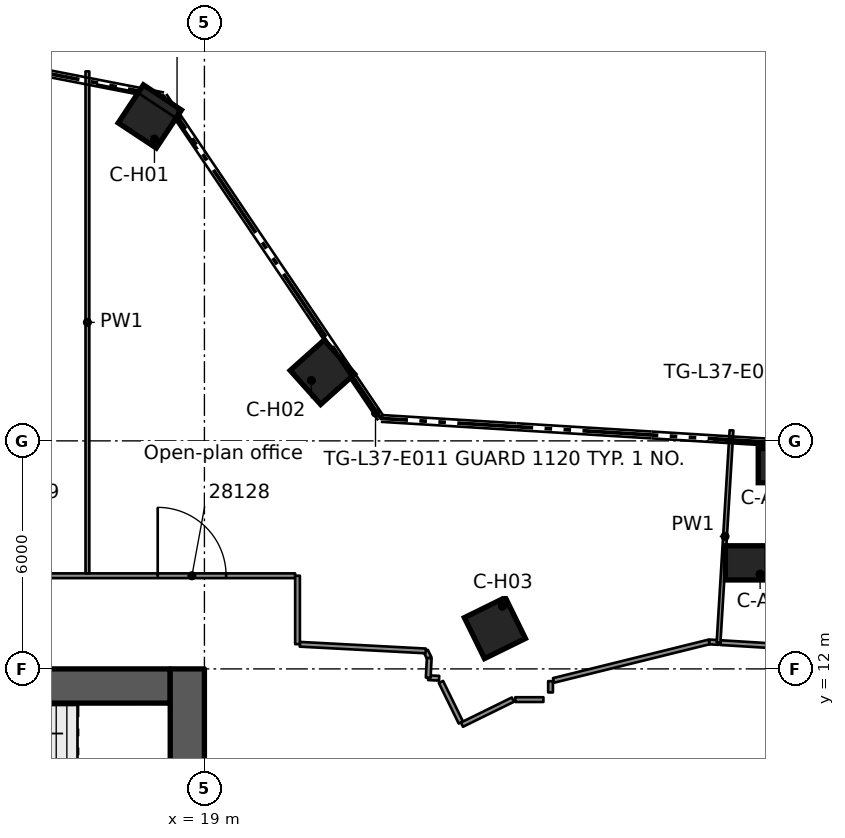
"""IFC4 building model, lengths in metres.
Left out: names, types, materials, properties, quantities, classifications, styles, units other than length and angle.
Written with IfcOpenShell. Run it as: python <this file> out.ifc"""

import sys

from ifc_helpers import new_model, si_unit, direction, frame, frame_2d, origin, origin_2d, place, context, subcontext, project, spatial, rectangle, extrude, element, fill, save


model = new_model("IFC4")
c1 = context("Model", 3, precision=1e-05, world=origin(), true_north=direction((0.0, 1.0)))
c2 = subcontext(c1, "Body", "Model", "MODEL_VIEW")
j1 = project(units=[si_unit("LENGTHUNIT", "METRE"), si_unit("PLANEANGLEUNIT", "RADIAN")], contexts=[c1])
p1 = place(None, origin())
s1 = spatial("IfcSite", under=j1, at=p1, CompositionType="ELEMENT")
p2 = place(p1, origin())
s2 = spatial("IfcBuilding", under=s1, at=p2, CompositionType="ELEMENT")
p3 = place(p2, frame((0.0, 0.0, 145.6)))
s3 = spatial("IfcBuildingStorey", under=s2, at=p3, CompositionType="ELEMENT", Elevation=145.6)
p4 = place(p3, frame((8.9, 11.55, 0.0), z_axis=(0.0, 0.0, 1.0), x_axis=(1.0, 0.0, 0.0)))
e1 = element("IfcWall", 1, at=p4, inside=s3, PredefinedType="SHEAR", context=c2, shape_type="SweptSolid", body=[
    extrude(rectangle(XDim=9.2, YDim=0.9, at=frame_2d((4.6, 0.0))), origin(), (0.0, 0.0, 1.0), 3.5),
])
p5 = place(p4, frame((3.0, 0.0, 0.0)))
e2 = element("IfcOpeningElement", 2, at=p5, cuts=e1, PredefinedType="OPENING", context=c2, shape_type="SweptSolid", body=[
    extrude(rectangle(XDim=1.1, YDim=2.1, at=frame_2d((0.55, 1.05))), frame((0.0, 0.46, 0.0), z_axis=(0.0, -1.0, 0.0), x_axis=(1.0, 0.0, 0.0)), (0.0, 0.0, 1.0), 0.92),
])
p6 = place(p3, frame((18.55, -12.0, 0.0), z_axis=(0.0, 0.0, 1.0), x_axis=(0.0, 1.0, 0.0)))
e3 = element("IfcWall", 3, at=p6, inside=s3, PredefinedType="SHEAR", context=c2, shape_type="SweptSolid", body=[
    extrude(rectangle(XDim=24.0, YDim=0.9, at=frame_2d((12.0, 0.0))), origin(), (0.0, 0.0, 1.0), 3.5),
])
p7 = place(p6, frame((12.1, 0.0, 0.0)))
e4 = element("IfcOpeningElement", 4, at=p7, cuts=e3, PredefinedType="OPENING", context=c2, shape_type="SweptSolid", body=[
    extrude(rectangle(XDim=1.8, YDim=2.1, at=frame_2d((0.9, 1.05))), frame((0.0, 0.46, 0.0), z_axis=(0.0, -1.0, 0.0), x_axis=(1.0, 0.0, 0.0)), (0.0, 0.0, 1.0), 0.92),
])
for number, where, z_axis, x_axis in (
    (5, (34.123, 17.349, 0.0), (0.0, 0.0, 1.0), (1.0, 0.0, 0.0)),
    (6, (33.258, 14.79, 0.0), (0.0, 0.0, 1.0), (1.0, 0.0, 0.0)),
):
    element("IfcColumn", number, at=place(p3, frame(where, z_axis=z_axis, x_axis=x_axis)), inside=s3, PredefinedType="COLUMN", context=c2, shape_type="SweptSolid", body=[
        extrude(rectangle(XDim=1.1, YDim=0.9, at=origin_2d()), origin(), (0.0, 0.0, 1.0), 3.5),
    ])
for number, where, z_axis, x_axis in (
    (7, (17.564, 26.536, 0.0), (0.0, 0.0, 1.0), (0.552, 0.834, 0.0)),
    (8, (22.104, 19.806, 0.0), (0.0, 0.0, 1.0), (0.745, 0.667, 0.0)),
    (9, (26.644, 13.075, 0.0), (0.0, 0.0, 1.0), (0.898, 0.441, 0.0)),
):
    element("IfcColumn", number, at=place(p3, frame(where, z_axis=z_axis, x_axis=x_axis)), inside=s3, PredefinedType="COLUMN", context=c2, shape_type="SweptSolid", body=[
        extrude(rectangle(XDim=1.2, YDim=1.2, at=origin_2d()), origin(), (0.0, 0.0, 1.0), 3.5),
    ])
p8 = place(p3, frame((24.824, 12.473, 0.0), z_axis=(0.0, 0.0, 1.0), x_axis=(0.437897211912, -0.899025045146, 0.0)))
e10 = element("IfcWall", 10, at=p8, inside=s3, PredefinedType="PARTITIONING", context=c2, shape_type="SweptSolid", body=[
    extrude(rectangle(XDim=0.21, YDim=0.125, at=frame_2d((0.105, 0.0))), origin(), (0.0, 0.0, 1.0), 3.08),
])
p9 = place(p3, frame((25.224, 11.657, 0.0), z_axis=(0.0, 0.0, 1.0), x_axis=(0.440468693638, -0.897767971096, 0.0)))
e11 = element("IfcWall", 11, at=p9, inside=s3, PredefinedType="PARTITIONING", context=c2, shape_type="SweptSolid", body=[
    extrude(rectangle(XDim=1.189, YDim=0.125, at=frame_2d((0.595, 0.0))), origin(), (0.0, 0.0, 1.0), 3.08),
])
p10 = place(p3, frame((32.281, 12.71, 0.0), z_axis=(0.0, 0.0, 1.0), x_axis=(0.998202495197, -0.059931449023, 0.0)))
e12 = element("IfcWall", 12, at=p10, inside=s3, PredefinedType="PARTITIONING", context=c2, shape_type="SweptSolid", body=[
    extrude(rectangle(XDim=0.249, YDim=0.125, at=frame_2d((0.124, 0.0))), origin(), (0.0, 0.0, 1.0), 3.08),
])
p11 = place(p3, frame((32.579, 12.692, 0.0), z_axis=(0.0, 0.0, 1.0), x_axis=(0.99812401512, -0.061224590168, 0.0)))
e13 = element("IfcWall", 13, at=p11, inside=s3, PredefinedType="PARTITIONING", context=c2, shape_type="SweptSolid", body=[
    extrude(rectangle(XDim=4.638, YDim=0.125, at=frame_2d((2.319, 0.0))), origin(), (0.0, 0.0, 1.0), 3.08),
])
p12 = place(p3, frame((24.889, 11.769, 0.0), z_axis=(0.0, 0.0, 1.0), x_axis=(0.998613133858, -0.052647971343, 0.0)))
e14 = element("IfcWall", 14, at=p12, inside=s3, PredefinedType="PARTITIONING", context=c2, shape_type="SweptSolid", body=[
    extrude(rectangle(XDim=0.288, YDim=0.125, at=frame_2d((0.144, 0.0))), origin(), (0.0, 0.0, 1.0), 3.08),
])
p13 = place(p3, frame((21.512, 12.648, 0.0), z_axis=(0.0, 0.0, 1.0), x_axis=(0.998605393802, -0.052794578038, 0.0)))
e15 = element("IfcWall", 15, at=p13, inside=s3, PredefinedType="PARTITIONING", context=c2, shape_type="SweptSolid", body=[
    extrude(rectangle(XDim=3.316, YDim=0.125, at=frame_2d((1.658, 0.0))), origin(), (0.0, 0.0, 1.0), 3.08),
])
p14 = place(p3, frame((27.18, 11.192, 0.0), z_axis=(0.0, 0.0, 1.0), x_axis=(1.0, 0.0, 0.0)))
e16 = element("IfcWall", 16, at=p14, inside=s3, PredefinedType="PARTITIONING", context=c2, shape_type="SweptSolid", body=[
    extrude(rectangle(XDim=0.74, YDim=0.125, at=frame_2d((0.37, 0.0))), origin(), (0.0, 0.0, 1.0), 3.08),
])
p15 = place(p3, frame((10.391, 14.451, 0.0), z_axis=(0.0, 0.0, 1.0), x_axis=(1.0, 0.0, 0.0)))
e17 = element("IfcWall", 17, at=p15, inside=s3, PredefinedType="PARTITIONING", context=c2, shape_type="SweptSolid", body=[
    extrude(rectangle(XDim=10.996, YDim=0.125, at=frame_2d((5.498, 0.0))), origin(), (0.0, 0.0, 1.0), 3.08),
])
p16 = place(p15, frame((7.38, 0.0, 0.0)))
e18 = element("IfcOpeningElement", 18, at=p16, cuts=e17, PredefinedType="OPENING", context=c2, shape_type="SweptSolid", body=[
    extrude(rectangle(XDim=1.8, YDim=2.1, at=frame_2d((0.9, 1.05))), frame((0.0, 0.073, 0.0), z_axis=(0.0, -1.0, 0.0), x_axis=(1.0, 0.0, 0.0)), (0.0, 0.0, 1.0), 0.145),
])
p17 = place(p15, frame((1.85, 0.0, 0.0)))
e19 = element("IfcOpeningElement", 19, at=p17, cuts=e17, PredefinedType="OPENING", context=c2, shape_type="SweptSolid", body=[
    extrude(rectangle(XDim=1.8, YDim=2.1, at=frame_2d((0.9, 1.05))), frame((0.0, 0.073, 0.0), z_axis=(0.0, -1.0, 0.0), x_axis=(1.0, 0.0, 0.0)), (0.0, 0.0, 1.0), 0.145),
])
p18 = place(p3, frame((32.281, 12.71, 0.0), z_axis=(0.0, 0.0, 1.0), x_axis=(-0.970728736882, -0.240178515673, 0.0)))
e20 = element("IfcWall", 20, at=p18, inside=s3, PredefinedType="PARTITIONING", context=c2, shape_type="SweptSolid", body=[
    extrude(rectangle(XDim=4.218, YDim=0.125, at=frame_2d((2.109, 0.0))), origin(), (0.0, 0.0, 1.0), 3.08),
])
p19 = place(p3, frame((25.776, 10.533, 0.0), z_axis=(0.0, 0.0, 1.0), x_axis=(0.897637072003, 0.440735393367, 0.0)))
e21 = element("IfcWall", 21, at=p19, inside=s3, PredefinedType="PARTITIONING", context=c2, shape_type="SweptSolid", body=[
    extrude(rectangle(XDim=1.495, YDim=0.125, at=frame_2d((0.748, 0.0))), origin(), (0.0, 0.0, 1.0), 3.08),
])
p20 = place(p3, frame((32.529, 12.695, 0.0), z_axis=(0.0, 0.0, 1.0), x_axis=(0.060986686306, 0.998138579604, 0.0)))
e22 = element("IfcWall", 22, at=p20, inside=s3, PredefinedType="PARTITIONING", context=c2, shape_type="SweptSolid", body=[
    extrude(rectangle(XDim=5.593, YDim=0.1, at=frame_2d((2.796, 0.0))), origin(), (0.0, 0.0, 1.0), 3.08),
])
p21 = place(p3, frame((24.889, 11.769, 0.0), z_axis=(0.0, 0.0, 1.0), x_axis=(0.052558833123, 0.998617829333, 0.0)))
e23 = element("IfcWall", 23, at=p21, inside=s3, PredefinedType="PARTITIONING", context=c2, shape_type="SweptSolid", body=[
    extrude(rectangle(XDim=0.516, YDim=0.125, at=frame_2d((0.258, 0.0))), origin(), (0.0, 0.0, 1.0), 3.08),
])
p22 = place(p3, frame((28.108, 11.381, 0.0), z_axis=(0.0, 0.0, 1.0), x_axis=(0.0, 1.0, 0.0)))
e24 = element("IfcWall", 24, at=p22, inside=s3, PredefinedType="PARTITIONING", context=c2, shape_type="SweptSolid", body=[
    extrude(rectangle(XDim=0.297, YDim=0.125, at=frame_2d((0.148, 0.0))), origin(), (0.0, 0.0, 1.0), 3.08),
])
p23 = place(p3, frame((21.45, 12.651, 0.0), z_axis=(0.0, 0.0, 1.0), x_axis=(0.0, 1.0, 0.0)))
e25 = element("IfcWall", 25, at=p23, inside=s3, PredefinedType="PARTITIONING", context=c2, shape_type="SweptSolid", body=[
    extrude(rectangle(XDim=1.8, YDim=0.125, at=frame_2d((0.9, 0.0))), origin(), (0.0, 0.0, 1.0), 3.08),
])
p24 = place(p3, frame((15.921, 14.514, 0.0), z_axis=(0.0, 0.0, 1.0), x_axis=(0.0, 1.0, 0.0)))
e26 = element("IfcWall", 26, at=p24, inside=s3, PredefinedType="PARTITIONING", context=c2, shape_type="SweptSolid", body=[
    extrude(rectangle(XDim=13.208, YDim=0.1, at=frame_2d((6.604, 0.0))), origin(), (0.0, 0.0, 1.0), 3.08),
])
p25 = place(p16, origin())
e27 = element("IfcDoor", 27, at=p25, inside=s3, OperationType="DOUBLE_DOOR_SINGLE_SWING", PredefinedType="DOOR", context=c2, shape_type="SweptSolid", body=[
    extrude(rectangle(XDim=1.8, YDim=2.1, at=frame_2d((0.9, 1.05))), frame((0.0, 0.025, 0.0), z_axis=(0.0, -1.0, 0.0), x_axis=(1.0, 0.0, 0.0)), (0.0, 0.0, 1.0), 0.05),
])
fill(e18, e27)
save(model, sys.argv[1])
